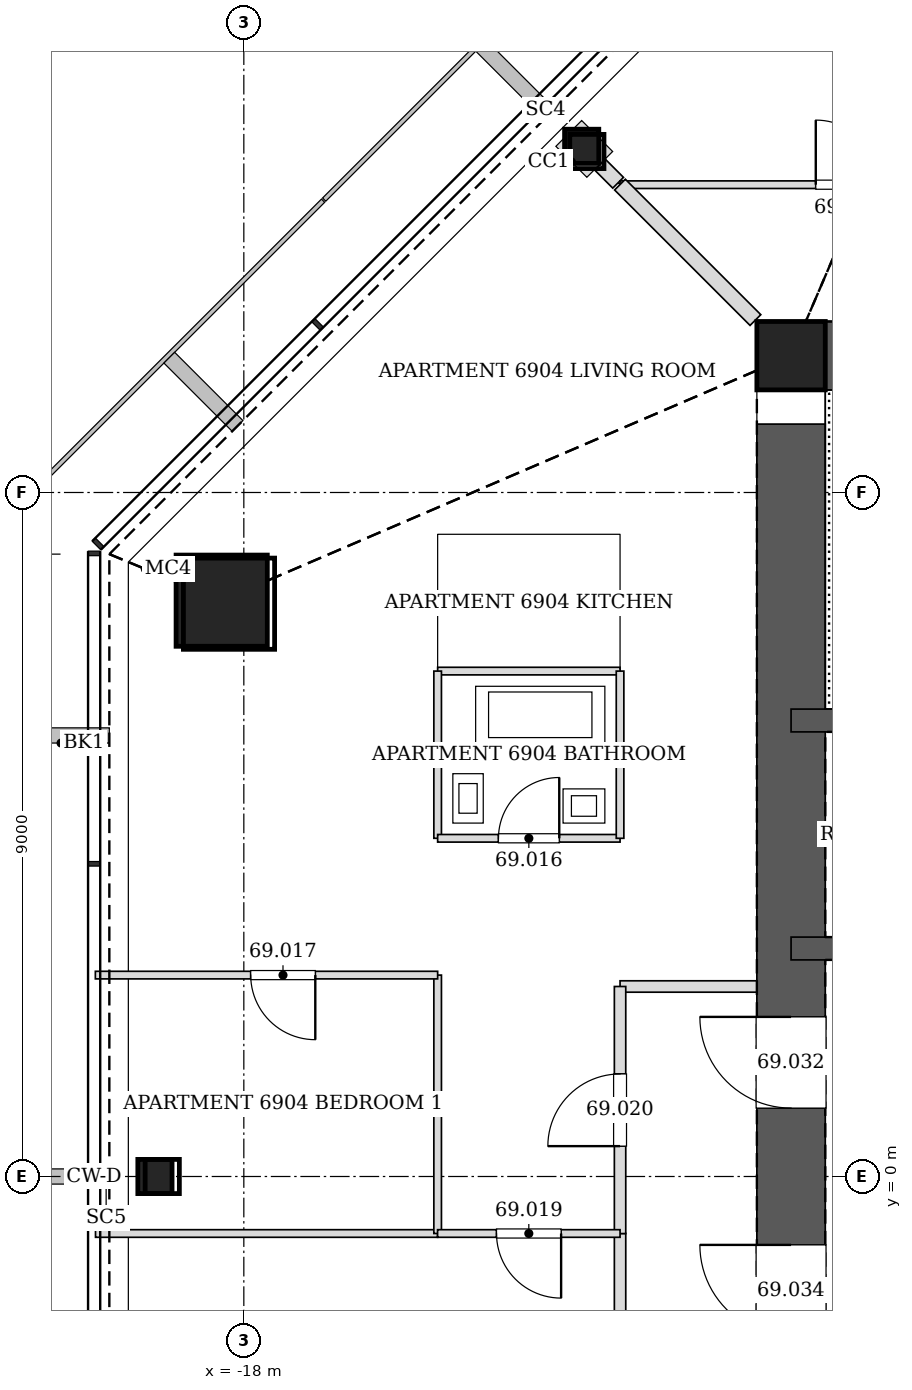
"""IFC4 building model, lengths in metres.
Left out: names, types, materials, properties, quantities, classifications, styles, units other than length and angle.
Written with IfcOpenShell. Run it as: python <this file> out.ifc"""

import sys

from ifc_helpers import new_model, si_unit, direction, frame, frame_2d, origin, origin_2d, place, context, subcontext, project, spatial, rectangle, hollow_rectangle, extrude, element, fill, save


model = new_model("IFC4")
c1 = context("Model", 3, precision=1e-05, world=origin(), true_north=direction((0.0, 1.0)))
c2 = subcontext(c1, "Body", "Model", "MODEL_VIEW")
j1 = project(units=[si_unit("LENGTHUNIT", "METRE"), si_unit("PLANEANGLEUNIT", "RADIAN")], contexts=[c1])
p1 = place(None, origin())
s1 = spatial("IfcSite", under=j1, at=p1, CompositionType="ELEMENT")
p2 = place(p1, origin())
s2 = spatial("IfcBuilding", under=s1, at=p2, CompositionType="ELEMENT")
p3 = place(p2, frame((0.0, 0.0, 284.4)))
s3 = spatial("IfcBuildingStorey", under=s2, at=p3, CompositionType="ELEMENT", Elevation=284.4)
p4 = place(p3, frame((-18.291, 7.576, 0.0), z_axis=(0.028277121884, -0.011698403216, 0.999531666202), x_axis=(0.382282742426, 0.924045401938, 0.0)))
e1 = element("IfcColumn", 1, at=p4, inside=s3, PredefinedType="COLUMN", context=c2, shape_type="SweptSolid", body=[
    extrude(hollow_rectangle(XDim=1.2, YDim=1.2, WallThickness=0.055, at=origin_2d()), origin(), (0.0, 0.0, 1.0), 3.402),
])
for number, where, z_axis, x_axis in (
    (2, (-13.555, 13.555, 0.0), (0.02, -0.02, 1.0), (0.707, 0.707, 0.0)),
    (3, (-19.169, 0.0, 0.0), (0.028, 0.0, 1.0), (0.0, 1.0, 0.0)),
):
    element("IfcColumn", number, at=place(p3, frame(where, z_axis=z_axis, x_axis=x_axis)), inside=s3, PredefinedType="COLUMN", context=c2, shape_type="SweptSolid", body=[
        extrude(hollow_rectangle(XDim=0.45, YDim=0.45, WallThickness=0.02, at=origin_2d()), origin(), (0.0, 0.0, 1.0), 3.402),
    ])
p5 = place(p3, frame((-10.8, 10.8, 0.0), z_axis=(0.0, 0.0, 1.0), x_axis=(1.0, 0.0, 0.0)))
e4 = element("IfcColumn", 4, at=p5, inside=s3, PredefinedType="COLUMN", context=c2, shape_type="SweptSolid", body=[
    extrude(hollow_rectangle(XDim=0.9, YDim=0.9, WallThickness=0.04, at=origin_2d()), origin(), (0.0, 0.0, 1.0), 3.4),
])
p6 = place(p3, frame((10.8, 10.8, 0.0), z_axis=(0.0, 0.0, 1.0), x_axis=(-1.0, 0.0, 0.0)))
e5 = element("IfcWall", 5, at=p6, inside=s3, PredefinedType="SOLIDWALL", context=c2, shape_type="SweptSolid", body=[
    extrude(rectangle(XDim=21.6, YDim=0.9, at=frame_2d((10.8, 0.0))), origin(), (0.0, 0.0, 1.0), 3.4),
])
p7 = place(p6, frame((10.05, 0.0, 0.0)))
e6 = element("IfcOpeningElement", 6, at=p7, cuts=e5, PredefinedType="OPENING", context=c2, shape_type="SweptSolid", body=[
    extrude(rectangle(XDim=1.5, YDim=2.1, at=frame_2d((0.75, 1.05))), frame((0.0, 0.46, 0.0), z_axis=(0.0, -1.0, 0.0), x_axis=(1.0, 0.0, 0.0)), (0.0, 0.0, 1.0), 0.92),
])
p8 = place(p3, frame((-10.8, 10.8, 0.0), z_axis=(0.0, 0.0, 1.0), x_axis=(0.0, -1.0, 0.0)))
e7 = element("IfcWall", 7, at=p8, inside=s3, PredefinedType="SOLIDWALL", context=c2, shape_type="SweptSolid", body=[
    extrude(rectangle(XDim=21.6, YDim=0.9, at=frame_2d((10.8, 0.0))), origin(), (0.0, 0.0, 1.0), 3.4),
])
p9 = place(p8, frame((8.7, 0.0, 0.0)))
e8 = element("IfcOpeningElement", 8, at=p9, cuts=e7, PredefinedType="OPENING", context=c2, shape_type="SweptSolid", body=[
    extrude(rectangle(XDim=1.2, YDim=2.1, at=frame_2d((0.6, 1.05))), frame((0.0, 0.46, 0.0), z_axis=(0.0, -1.0, 0.0), x_axis=(1.0, 0.0, 0.0)), (0.0, 0.0, 1.0), 0.92),
])
p10 = place(p8, frame((11.7, 0.0, 0.0)))
e9 = element("IfcOpeningElement", 9, at=p10, cuts=e7, PredefinedType="OPENING", context=c2, shape_type="SweptSolid", body=[
    extrude(rectangle(XDim=1.2, YDim=2.1, at=frame_2d((0.6, 1.05))), frame((0.0, 0.46, 0.0), z_axis=(0.0, -1.0, 0.0), x_axis=(1.0, 0.0, 0.0)), (0.0, 0.0, 1.0), 0.92),
])
p11 = place(p3, frame((-10.8, 3.0, 0.0), z_axis=(0.0, 0.0, 1.0), x_axis=(1.0, 0.0, 0.0)))
e10 = element("IfcWall", 10, at=p11, inside=s3, PredefinedType="SOLIDWALL", context=c2, shape_type="SweptSolid", body=[
    extrude(rectangle(XDim=21.6, YDim=0.3, at=frame_2d((10.8, 0.0))), origin(), (0.0, 0.0, 1.0), 3.4),
])
p12 = place(p11, frame((1.65, 0.0, 0.0)))
e11 = element("IfcOpeningElement", 11, at=p12, cuts=e10, PredefinedType="OPENING", context=c2, shape_type="SweptSolid", body=[
    extrude(rectangle(XDim=0.9, YDim=2.1, at=frame_2d((0.45, 1.05))), frame((0.0, 0.16, 0.0), z_axis=(0.0, -1.0, 0.0), x_axis=(1.0, 0.0, 0.0)), (0.0, 0.0, 1.0), 0.32),
])
p13 = place(p11, frame((4.55, 0.0, 0.0)))
e12 = element("IfcOpeningElement", 12, at=p13, cuts=e10, PredefinedType="OPENING", context=c2, shape_type="SweptSolid", body=[
    extrude(rectangle(XDim=0.9, YDim=2.1, at=frame_2d((0.45, 1.05))), frame((0.0, 0.16, 0.0), z_axis=(0.0, -1.0, 0.0), x_axis=(1.0, 0.0, 0.0)), (0.0, 0.0, 1.0), 0.32),
])
p14 = place(p11, frame((7.45, 0.0, 0.0)))
e13 = element("IfcOpeningElement", 13, at=p14, cuts=e10, PredefinedType="OPENING", context=c2, shape_type="SweptSolid", body=[
    extrude(rectangle(XDim=0.9, YDim=2.1, at=frame_2d((0.45, 1.05))), frame((0.0, 0.16, 0.0), z_axis=(0.0, -1.0, 0.0), x_axis=(1.0, 0.0, 0.0)), (0.0, 0.0, 1.0), 0.32),
])
p15 = place(p11, frame((13.25, 0.0, 0.0)))
e14 = element("IfcOpeningElement", 14, at=p15, cuts=e10, PredefinedType="OPENING", context=c2, shape_type="SweptSolid", body=[
    extrude(rectangle(XDim=0.9, YDim=2.1, at=frame_2d((0.45, 1.05))), frame((0.0, 0.16, 0.0), z_axis=(0.0, -1.0, 0.0), x_axis=(1.0, 0.0, 0.0)), (0.0, 0.0, 1.0), 0.32),
])
p16 = place(p11, frame((16.15, 0.0, 0.0)))
e15 = element("IfcOpeningElement", 15, at=p16, cuts=e10, PredefinedType="OPENING", context=c2, shape_type="SweptSolid", body=[
    extrude(rectangle(XDim=0.9, YDim=2.1, at=frame_2d((0.45, 1.05))), frame((0.0, 0.16, 0.0), z_axis=(0.0, -1.0, 0.0), x_axis=(1.0, 0.0, 0.0)), (0.0, 0.0, 1.0), 0.32),
])
p17 = place(p11, frame((19.05, 0.0, 0.0)))
e16 = element("IfcOpeningElement", 16, at=p17, cuts=e10, PredefinedType="OPENING", context=c2, shape_type="SweptSolid", body=[
    extrude(rectangle(XDim=0.9, YDim=2.1, at=frame_2d((0.45, 1.05))), frame((0.0, 0.16, 0.0), z_axis=(0.0, -1.0, 0.0), x_axis=(1.0, 0.0, 0.0)), (0.0, 0.0, 1.0), 0.32),
])
p18 = place(p3, frame((-10.8, 6.0, 0.0), z_axis=(0.0, 0.0, 1.0), x_axis=(1.0, 0.0, 0.0)))
e17 = element("IfcWall", 17, at=p18, inside=s3, PredefinedType="SOLIDWALL", context=c2, shape_type="SweptSolid", body=[
    extrude(rectangle(XDim=21.6, YDim=0.3, at=frame_2d((10.8, 0.0))), origin(), (0.0, 0.0, 1.0), 3.4),
])
p19 = place(p18, frame((10.25, 0.0, 0.0)))
e18 = element("IfcOpeningElement", 18, at=p19, cuts=e17, PredefinedType="OPENING", context=c2, shape_type="SweptSolid", body=[
    extrude(rectangle(XDim=1.1, YDim=2.1, at=frame_2d((0.55, 1.05))), frame((0.0, 0.16, 0.0), z_axis=(0.0, -1.0, 0.0), x_axis=(1.0, 0.0, 0.0)), (0.0, 0.0, 1.0), 0.32),
])
p20 = place(p3, frame((-13.05, -0.749, 0.0), z_axis=(0.0, 0.0, 1.0), x_axis=(0.0, -1.0, 0.0)))
e19 = element("IfcWall", 19, at=p20, inside=s3, PredefinedType="PARTITIONING", context=c2, shape_type="SweptSolid", body=[
    extrude(rectangle(XDim=1.502, YDim=0.15, at=frame_2d((0.751, 0.0))), origin(), (0.0, 0.0, 1.0), 3.2),
])
p21 = place(p3, frame((-11.25, 2.5, 0.0), z_axis=(0.0, 0.0, 1.0), x_axis=(-1.0, 0.0, 0.0)))
e20 = element("IfcWall", 20, at=p21, inside=s3, PredefinedType="PARTITIONING", context=c2, shape_type="SweptSolid", body=[
    extrude(rectangle(XDim=1.8, YDim=0.15, at=frame_2d((0.9, 0.0))), origin(), (0.0, 0.0, 1.0), 3.2),
])
p22 = place(p3, frame((-13.05, 2.5, 0.0), z_axis=(0.0, 0.0, 1.0), x_axis=(0.0, -1.0, 0.0)))
e21 = element("IfcWall", 21, at=p22, inside=s3, PredefinedType="PARTITIONING", context=c2, shape_type="SweptSolid", body=[
    extrude(rectangle(XDim=3.251, YDim=0.15, at=frame_2d((1.625, 0.0))), origin(), (0.0, 0.0, 1.0), 2.349),
])
p23 = place(p22, frame((1.15, 0.0, 0.0)))
e22 = element("IfcOpeningElement", 22, at=p23, cuts=e21, PredefinedType="OPENING", context=c2, shape_type="SweptSolid", body=[
    extrude(rectangle(XDim=0.95, YDim=2.1, at=frame_2d((0.475, 1.05))), frame((0.0, 0.085, 0.0), z_axis=(0.0, -1.0, 0.0), x_axis=(1.0, 0.0, 0.0)), (0.0, 0.0, 1.0), 0.17),
])
p24 = place(p3, frame((-13.314, 13.314, 0.0), z_axis=(0.0, 0.0, 1.0), x_axis=(0.707106781187, -0.707106781187, 0.0)))
e23 = element("IfcWall", 23, at=p24, inside=s3, PredefinedType="PARTITIONING", context=c2, shape_type="SweptSolid", body=[
    extrude(rectangle(XDim=0.338, YDim=0.2, at=frame_2d((0.169, 0.0))), origin(), (0.0, 0.0, 1.0), 2.591),
])
p25 = place(p3, frame((-13.05, 13.05, 0.0), z_axis=(0.0, 0.0, 1.0), x_axis=(1.0, 0.0, 0.0)))
e24 = element("IfcWall", 24, at=p25, inside=s3, PredefinedType="PARTITIONING", context=c2, shape_type="SweptSolid", body=[
    extrude(rectangle(XDim=6.0, YDim=0.1, at=frame_2d((3.0, 0.0))), origin(), (0.0, 0.0, 1.0), 2.497),
])
p26 = place(p25, frame((2.575, 0.0, 0.0)))
e25 = element("IfcOpeningElement", 25, at=p26, cuts=e24, PredefinedType="OPENING", context=c2, shape_type="SweptSolid", body=[
    extrude(rectangle(XDim=0.85, YDim=2.1, at=frame_2d((0.425, 1.05))), frame((0.0, 0.06, 0.0), z_axis=(0.0, -1.0, 0.0), x_axis=(1.0, 0.0, 0.0)), (0.0, 0.0, 1.0), 0.12),
])
p27 = place(p3, frame((-15.45, 6.65, 0.0), z_axis=(0.0, 0.0, 1.0), x_axis=(1.0, 0.0, 0.0)))
e26 = element("IfcWall", 26, at=p27, inside=s3, PredefinedType="PARTITIONING", context=c2, shape_type="SweptSolid", body=[
    extrude(rectangle(XDim=2.4, YDim=0.1, at=frame_2d((1.2, 0.0))), origin(), (0.0, 0.0, 1.0), 2.591),
])
p28 = place(p3, frame((-15.45, 6.65, 0.0), z_axis=(0.0, 0.0, 1.0), x_axis=(0.0, -1.0, 0.0)))
e27 = element("IfcWall", 27, at=p28, inside=s3, PredefinedType="PARTITIONING", context=c2, shape_type="SweptSolid", body=[
    extrude(rectangle(XDim=2.2, YDim=0.1, at=frame_2d((1.1, 0.0))), origin(), (0.0, 0.0, 1.0), 3.2),
])
p29 = place(p3, frame((-15.45, 4.45, 0.0), z_axis=(0.0, 0.0, 1.0), x_axis=(1.0, 0.0, 0.0)))
e28 = element("IfcWall", 28, at=p29, inside=s3, PredefinedType="PARTITIONING", context=c2, shape_type="SweptSolid", body=[
    extrude(rectangle(XDim=2.4, YDim=0.1, at=frame_2d((1.2, 0.0))), origin(), (0.0, 0.0, 1.0), 2.591),
])
p30 = place(p29, frame((0.8, 0.0, 0.0)))
e29 = element("IfcOpeningElement", 29, at=p30, cuts=e28, PredefinedType="OPENING", context=c2, shape_type="SweptSolid", body=[
    extrude(rectangle(XDim=0.8, YDim=2.1, at=frame_2d((0.4, 1.05))), frame((0.0, 0.06, 0.0), z_axis=(0.0, -1.0, 0.0), x_axis=(1.0, 0.0, 0.0)), (0.0, 0.0, 1.0), 0.12),
])
p31 = place(p3, frame((-13.05, 4.45, 0.0), z_axis=(0.0, 0.0, 1.0), x_axis=(0.0, 1.0, 0.0)))
e30 = element("IfcWall", 30, at=p31, inside=s3, PredefinedType="PARTITIONING", context=c2, shape_type="SweptSolid", body=[
    extrude(rectangle(XDim=2.2, YDim=0.1, at=frame_2d((1.1, 0.0))), origin(), (0.0, 0.0, 1.0), 3.2),
])
p32 = place(p3, frame((-19.951, -0.75, 0.0), z_axis=(0.0, 0.0, 1.0), x_axis=(1.0, 0.0, 0.0)))
e31 = element("IfcWall", 31, at=p32, inside=s3, PredefinedType="PARTITIONING", context=c2, shape_type="SweptSolid", body=[
    extrude(rectangle(XDim=4.501, YDim=0.1, at=frame_2d((2.251, 0.0))), origin(), (0.0, 0.0, 1.0), 2.591),
])
p33 = place(p3, frame((-15.45, -0.75, 0.0), z_axis=(0.0, 0.0, 1.0), x_axis=(0.0, 1.0, 0.0)))
e32 = element("IfcWall", 32, at=p33, inside=s3, PredefinedType="PARTITIONING", context=c2, shape_type="SweptSolid", body=[
    extrude(rectangle(XDim=3.4, YDim=0.1, at=frame_2d((1.7, 0.0))), origin(), (0.0, 0.0, 1.0), 2.349),
])
p34 = place(p3, frame((-15.45, 2.65, 0.0), z_axis=(0.0, 0.0, 1.0), x_axis=(-1.0, 0.0, 0.0)))
e33 = element("IfcWall", 33, at=p34, inside=s3, PredefinedType="PARTITIONING", context=c2, shape_type="SweptSolid", body=[
    extrude(rectangle(XDim=4.503, YDim=0.1, at=frame_2d((2.252, 0.0))), origin(), (0.0, 0.0, 1.0), 2.591),
])
p35 = place(p34, frame((1.61, 0.0, 0.0)))
e34 = element("IfcOpeningElement", 34, at=p35, cuts=e33, PredefinedType="OPENING", context=c2, shape_type="SweptSolid", body=[
    extrude(rectangle(XDim=0.85, YDim=2.1, at=frame_2d((0.425, 1.05))), frame((0.0, 0.06, 0.0), z_axis=(0.0, -1.0, 0.0), x_axis=(1.0, 0.0, 0.0)), (0.0, 0.0, 1.0), 0.12),
])
p36 = place(p3, frame((-13.05, -0.75, 0.0), z_axis=(0.0, 0.0, 1.0), x_axis=(-1.0, 0.0, 0.0)))
e35 = element("IfcWall", 35, at=p36, inside=s3, PredefinedType="PARTITIONING", context=c2, shape_type="SweptSolid", body=[
    extrude(rectangle(XDim=2.401, YDim=0.1, at=frame_2d((1.2, 0.0))), origin(), (0.0, 0.0, 1.0), 2.591),
])
p37 = place(p36, frame((0.775, 0.0, 0.0)))
e36 = element("IfcOpeningElement", 36, at=p37, cuts=e35, PredefinedType="OPENING", context=c2, shape_type="SweptSolid", body=[
    extrude(rectangle(XDim=0.85, YDim=2.1, at=frame_2d((0.425, 1.05))), frame((0.0, 0.06, 0.0), z_axis=(0.0, -1.0, 0.0), x_axis=(1.0, 0.0, 0.0)), (0.0, 0.0, 1.0), 0.12),
])
p38 = place(p3, frame((-11.269, 11.269, 0.0), z_axis=(0.0, 0.0, 1.0), x_axis=(-0.707106781187, 0.707106781187, 0.0)))
e37 = element("IfcWall", 37, at=p38, inside=s3, PredefinedType="PARTITIONING", context=c2, shape_type="SweptSolid", body=[
    extrude(rectangle(XDim=2.52, YDim=0.2, at=frame_2d((1.26, 0.0))), origin(), (0.0, 0.0, 1.0), 2.591),
])
p39 = place(p26, origin())
e38 = element("IfcDoor", 38, at=p39, inside=s3, OperationType="SINGLE_SWING_LEFT", PredefinedType="DOOR", context=c2, shape_type="SweptSolid", body=[
    extrude(rectangle(XDim=0.85, YDim=2.1, at=frame_2d((0.425, 1.05))), frame((0.0, 0.025, 0.0), z_axis=(0.0, -1.0, 0.0), x_axis=(1.0, 0.0, 0.0)), (0.0, 0.0, 1.0), 0.05),
])
fill(e25, e38)
p40 = place(p30, origin())
e39 = element("IfcDoor", 39, at=p40, inside=s3, OperationType="SINGLE_SWING_RIGHT", PredefinedType="DOOR", context=c2, shape_type="SweptSolid", body=[
    extrude(rectangle(XDim=0.8, YDim=2.1, at=frame_2d((0.4, 1.05))), frame((0.0, 0.025, 0.0), z_axis=(0.0, -1.0, 0.0), x_axis=(1.0, 0.0, 0.0)), (0.0, 0.0, 1.0), 0.05),
])
fill(e29, e39)
p41 = place(p35, origin())
e40 = element("IfcDoor", 40, at=p41, inside=s3, OperationType="SINGLE_SWING_LEFT", PredefinedType="DOOR", context=c2, shape_type="SweptSolid", body=[
    extrude(rectangle(XDim=0.85, YDim=2.1, at=frame_2d((0.425, 1.05))), frame((0.0, 0.025, 0.0), z_axis=(0.0, -1.0, 0.0), x_axis=(1.0, 0.0, 0.0)), (0.0, 0.0, 1.0), 0.05),
])
fill(e34, e40)
p42 = place(p37, origin())
e41 = element("IfcDoor", 41, at=p42, inside=s3, OperationType="SINGLE_SWING_LEFT", PredefinedType="DOOR", context=c2, shape_type="SweptSolid", body=[
    extrude(rectangle(XDim=0.85, YDim=2.1, at=frame_2d((0.425, 1.05))), frame((0.0, 0.025, 0.0), z_axis=(0.0, -1.0, 0.0), x_axis=(1.0, 0.0, 0.0)), (0.0, 0.0, 1.0), 0.05),
])
fill(e36, e41)
p43 = place(p23, frame((0.95, 0.0, 0.0), z_axis=(0.0, 0.0, 1.0), x_axis=(-1.0, 0.0, 0.0)))
e42 = element("IfcDoor", 42, at=p43, inside=s3, OperationType="SINGLE_SWING_LEFT", PredefinedType="DOOR", context=c2, shape_type="SweptSolid", body=[
    extrude(rectangle(XDim=0.95, YDim=2.1, at=frame_2d((0.475, 1.05))), frame((0.0, 0.025, 0.0), z_axis=(0.0, -1.0, 0.0), x_axis=(1.0, 0.0, 0.0)), (0.0, 0.0, 1.0), 0.05),
])
fill(e22, e42)
p44 = place(p9, frame((1.2, 0.0, 0.0), z_axis=(0.0, 0.0, 1.0), x_axis=(-1.0, 0.0, 0.0)))
e43 = element("IfcDoor", 43, at=p44, inside=s3, OperationType="SINGLE_SWING_RIGHT", PredefinedType="DOOR", context=c2, shape_type="SweptSolid", body=[
    extrude(rectangle(XDim=1.2, YDim=2.1, at=frame_2d((0.6, 1.05))), frame((0.0, 0.025, 0.0), z_axis=(0.0, -1.0, 0.0), x_axis=(1.0, 0.0, 0.0)), (0.0, 0.0, 1.0), 0.05),
])
fill(e8, e43)
p45 = place(p10, frame((1.2, 0.0, 0.0), z_axis=(0.0, 0.0, 1.0), x_axis=(-1.0, 0.0, 0.0)))
e44 = element("IfcDoor", 44, at=p45, inside=s3, OperationType="SINGLE_SWING_RIGHT", PredefinedType="DOOR", context=c2, shape_type="SweptSolid", body=[
    extrude(rectangle(XDim=1.2, YDim=2.1, at=frame_2d((0.6, 1.05))), frame((0.0, 0.025, 0.0), z_axis=(0.0, -1.0, 0.0), x_axis=(1.0, 0.0, 0.0)), (0.0, 0.0, 1.0), 0.05),
])
fill(e9, e44)
save(model, sys.argv[1])
